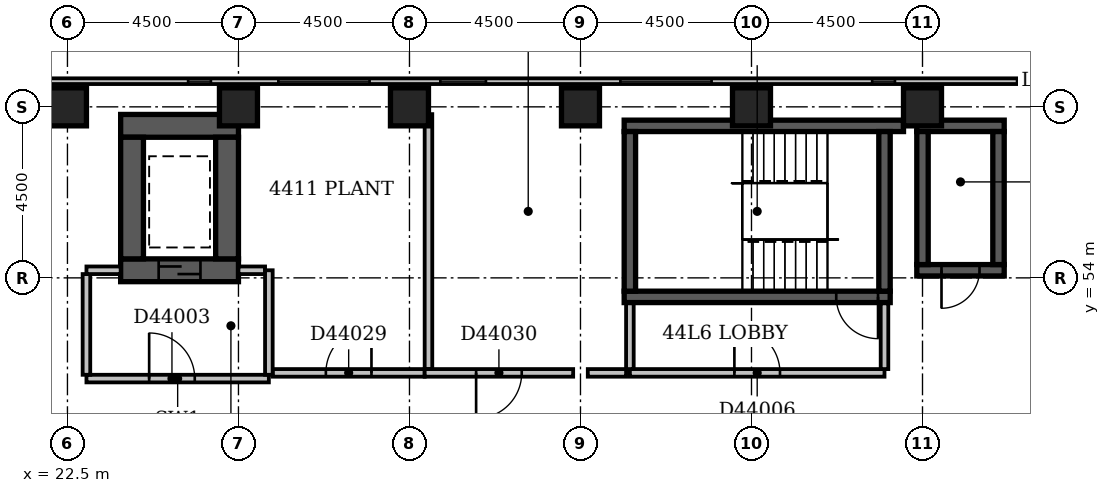
"""IFC4 building model, lengths in metres.
Left out: names, types, materials, properties, quantities, classifications, styles, units other than length and angle.
Written with IfcOpenShell. Run it as: python <this file> out.ifc"""

import sys

from ifc_helpers import new_model, si_unit, direction, frame, frame_2d, origin, origin_2d, place, context, subcontext, project, spatial, rectangle, extrude, element, fill, save


model = new_model("IFC4")
c1 = context("Model", 3, precision=1e-05, world=origin(), true_north=direction((0.0, 1.0)))
c2 = subcontext(c1, "Body", "Model", "MODEL_VIEW")
j1 = project(units=[si_unit("LENGTHUNIT", "METRE"), si_unit("PLANEANGLEUNIT", "RADIAN")], contexts=[c1])
p1 = place(None, origin())
s1 = spatial("IfcSite", under=j1, at=p1, CompositionType="ELEMENT")
p2 = place(p1, origin())
s2 = spatial("IfcBuilding", under=s1, at=p2, CompositionType="ELEMENT")
p3 = place(p2, frame((0.0, 0.0, 173.6)))
s3 = spatial("IfcBuildingStorey", under=s2, at=p3, CompositionType="ELEMENT", Elevation=173.6)
p4 = place(p3, frame((23.9, 54.2, -0.45), z_axis=(0.0, 0.0, 1.0), x_axis=(1.0, 0.0, 0.0)))
e1 = element("IfcWall", 1, at=p4, inside=s3, PredefinedType="SHEAR", context=c2, shape_type="SweptSolid", body=[
    extrude(rectangle(XDim=3.1, YDim=0.6, at=frame_2d((1.55, 0.0))), origin(), (0.0, 0.0, 1.0), 5.55),
])
p5 = place(p4, frame((1.0, 0.0, 0.45)))
e2 = element("IfcOpeningElement", 2, at=p5, cuts=e1, PredefinedType="OPENING", context=c2, shape_type="SweptSolid", body=[
    extrude(rectangle(XDim=1.1, YDim=2.1, at=frame_2d((0.55, 1.05))), frame((0.0, 0.312, 0.0), z_axis=(0.0, -1.0, 0.0), x_axis=(1.0, 0.0, 0.0)), (0.0, 0.0, 1.0), 0.624),
])
p6 = place(p3, frame((23.9, 58.0, -0.45), z_axis=(0.0, 0.0, 1.0), x_axis=(1.0, 0.0, 0.0)))
e3 = element("IfcWall", 3, at=p6, inside=s3, PredefinedType="SHEAR", context=c2, shape_type="SweptSolid", body=[
    extrude(rectangle(XDim=3.1, YDim=0.6, at=frame_2d((1.55, 0.0))), origin(), (0.0, 0.0, 1.0), 5.55),
])
for number, where, z_axis, x_axis in (
    (4, (24.2, 54.5, -0.45), (0.0, 0.0, 1.0), (0.0, 1.0, 0.0)),
    (5, (26.7, 54.5, -0.45), (0.0, 0.0, 1.0), (0.0, 1.0, 0.0)),
):
    element("IfcWall", number, at=place(p3, frame(where, z_axis=z_axis, x_axis=x_axis)), inside=s3, PredefinedType="SHEAR", context=c2, shape_type="SweptSolid", body=[
        extrude(rectangle(XDim=3.2, YDim=0.6, at=frame_2d((1.6, 0.0))), origin(), (0.0, 0.0, 1.0), 5.55),
    ])
p7 = place(p3, frame((37.15, 53.5, -0.45), z_axis=(0.0, 0.0, 1.0), x_axis=(1.0, 0.0, 0.0)))
e6 = element("IfcWall", 6, at=p7, inside=s3, PredefinedType="SHEAR", context=c2, shape_type="SweptSolid", body=[
    extrude(rectangle(XDim=7.0, YDim=0.3, at=frame_2d((3.5, 0.0))), origin(), (0.0, 0.0, 1.0), 5.55),
])
p8 = place(p7, frame((5.58, 0.0, 0.45)))
e7 = element("IfcOpeningElement", 7, at=p8, cuts=e6, PredefinedType="OPENING", context=c2, shape_type="SweptSolid", body=[
    extrude(rectangle(XDim=1.1, YDim=2.1, at=frame_2d((0.55, 1.05))), frame((0.0, 0.162, 0.0), z_axis=(0.0, -1.0, 0.0), x_axis=(1.0, 0.0, 0.0)), (0.0, 0.0, 1.0), 0.324),
])
p9 = place(p3, frame((37.15, 58.0, -0.45), z_axis=(0.0, 0.0, 1.0), x_axis=(1.0, 0.0, 0.0)))
e8 = element("IfcWall", 8, at=p9, inside=s3, PredefinedType="SHEAR", context=c2, shape_type="SweptSolid", body=[
    extrude(rectangle(XDim=7.35, YDim=0.3, at=frame_2d((3.675, 0.0))), origin(), (0.0, 0.0, 1.0), 5.55),
])
for number, where, z_axis, x_axis in (
    (9, (37.3, 53.65, -0.45), (0.0, 0.0, 1.0), (0.0, 1.0, 0.0)),
    (10, (44.0, 53.65, -0.45), (0.0, 0.0, 1.0), (0.0, 1.0, 0.0)),
):
    element("IfcWall", number, at=place(p3, frame(where, z_axis=z_axis, x_axis=x_axis)), inside=s3, PredefinedType="SHEAR", context=c2, shape_type="SweptSolid", body=[
        extrude(rectangle(XDim=4.2, YDim=0.3, at=frame_2d((2.1, 0.0))), origin(), (0.0, 0.0, 1.0), 5.55),
    ])
p10 = place(p3, frame((44.85, 54.2, -0.45), z_axis=(0.0, 0.0, 1.0), x_axis=(1.0, 0.0, 0.0)))
e11 = element("IfcWall", 11, at=p10, inside=s3, PredefinedType="SHEAR", context=c2, shape_type="SweptSolid", body=[
    extrude(rectangle(XDim=2.3, YDim=0.3, at=frame_2d((1.15, 0.0))), origin(), (0.0, 0.0, 1.0), 5.55),
])
p11 = place(p10, frame((0.65, 0.0, 0.45)))
e12 = element("IfcOpeningElement", 12, at=p11, cuts=e11, PredefinedType="OPENING", context=c2, shape_type="SweptSolid", body=[
    extrude(rectangle(XDim=1.0, YDim=2.1, at=frame_2d((0.5, 1.05))), frame((0.0, 0.162, 0.0), z_axis=(0.0, -1.0, 0.0), x_axis=(1.0, 0.0, 0.0)), (0.0, 0.0, 1.0), 0.324),
])
p12 = place(p3, frame((44.85, 58.0, -0.45), z_axis=(0.0, 0.0, 1.0), x_axis=(1.0, 0.0, 0.0)))
e13 = element("IfcWall", 13, at=p12, inside=s3, PredefinedType="SHEAR", context=c2, shape_type="SweptSolid", body=[
    extrude(rectangle(XDim=2.3, YDim=0.3, at=frame_2d((1.15, 0.0))), origin(), (0.0, 0.0, 1.0), 5.55),
])
for number, where, z_axis, x_axis in (
    (14, (45.0, 54.35, -0.45), (0.0, 0.0, 1.0), (0.0, 1.0, 0.0)),
    (15, (47.0, 54.35, -0.45), (0.0, 0.0, 1.0), (0.0, 1.0, 0.0)),
):
    element("IfcWall", number, at=place(p3, frame(where, z_axis=z_axis, x_axis=x_axis)), inside=s3, PredefinedType="SHEAR", context=c2, shape_type="SweptSolid", body=[
        extrude(rectangle(XDim=3.5, YDim=0.3, at=frame_2d((1.75, 0.0))), origin(), (0.0, 0.0, 1.0), 5.55),
    ])
for number, where, z_axis, x_axis in (
    (16, (22.5, 58.5, -0.45), (0.0, 0.0, 1.0), (1.0, 0.0, 0.0)),
    (17, (27.0, 58.5, -0.45), (0.0, 0.0, 1.0), (1.0, 0.0, 0.0)),
    (18, (31.5, 58.5, -0.45), (0.0, 0.0, 1.0), (1.0, 0.0, 0.0)),
    (19, (36.0, 58.5, -0.45), (0.0, 0.0, 1.0), (1.0, 0.0, 0.0)),
    (20, (40.5, 58.5, -0.45), (0.0, 0.0, 1.0), (1.0, 0.0, 0.0)),
    (21, (45.0, 58.5, -0.45), (0.0, 0.0, 1.0), (1.0, 0.0, 0.0)),
):
    element("IfcColumn", number, at=place(p3, frame(where, z_axis=z_axis, x_axis=x_axis)), inside=s3, PredefinedType="COLUMN", context=c2, shape_type="SweptSolid", body=[
        extrude(rectangle(XDim=1.0, YDim=1.0, at=origin_2d()), origin(), (0.0, 0.0, 1.0), 5.55),
    ])
p13 = place(p3, frame((68.1, 59.175, 0.0), z_axis=(0.0, 0.0, 1.0), x_axis=(-1.0, 0.0, 0.0)))
e22 = element("IfcWall", 22, at=p13, inside=s3, PredefinedType="STANDARD", context=c2, shape_type="SweptSolid", body=[
    extrude(rectangle(XDim=68.85, YDim=0.15, at=frame_2d((34.425, 0.0))), origin(), (0.0, 0.0, 1.0), 4.5),
])
p14 = place(p13, frame((1.65, 0.0, 0.6)))
e23 = element("IfcOpeningElement", 23, at=p14, cuts=e22, PredefinedType="OPENING", context=c2, shape_type="SweptSolid", body=[
    extrude(rectangle(XDim=2.4, YDim=2.4, at=frame_2d((1.2, 1.2))), frame((0.0, 0.087, 0.0), z_axis=(0.0, -1.0, 0.0), x_axis=(1.0, 0.0, 0.0)), (0.0, 0.0, 1.0), 0.174),
])
p15 = place(p13, frame((10.65, 0.0, 0.6)))
e24 = element("IfcOpeningElement", 24, at=p15, cuts=e22, PredefinedType="OPENING", context=c2, shape_type="SweptSolid", body=[
    extrude(rectangle(XDim=2.4, YDim=2.4, at=frame_2d((1.2, 1.2))), frame((0.0, 0.087, 0.0), z_axis=(0.0, -1.0, 0.0), x_axis=(1.0, 0.0, 0.0)), (0.0, 0.0, 1.0), 0.174),
])
p16 = place(p13, frame((14.825, 0.0, 0.6)))
e25 = element("IfcOpeningElement", 25, at=p16, cuts=e22, PredefinedType="OPENING", context=c2, shape_type="SweptSolid", body=[
    extrude(rectangle(XDim=0.6, YDim=2.4, at=frame_2d((0.3, 1.2))), frame((0.0, 0.087, 0.0), z_axis=(0.0, -1.0, 0.0), x_axis=(1.0, 0.0, 0.0)), (0.0, 0.0, 1.0), 0.174),
])
p17 = place(p13, frame((19.412, 0.0, 0.6)))
e26 = element("IfcOpeningElement", 26, at=p17, cuts=e22, PredefinedType="OPENING", context=c2, shape_type="SweptSolid", body=[
    extrude(rectangle(XDim=1.2, YDim=2.4, at=frame_2d((0.6, 1.2))), frame((0.0, 0.087, 0.0), z_axis=(0.0, -1.0, 0.0), x_axis=(1.0, 0.0, 0.0)), (0.0, 0.0, 1.0), 0.174),
])
p18 = place(p13, frame((23.825, 0.0, 0.6)))
e27 = element("IfcOpeningElement", 27, at=p18, cuts=e22, PredefinedType="OPENING", context=c2, shape_type="SweptSolid", body=[
    extrude(rectangle(XDim=0.6, YDim=2.4, at=frame_2d((0.3, 1.2))), frame((0.0, 0.087, 0.0), z_axis=(0.0, -1.0, 0.0), x_axis=(1.0, 0.0, 0.0)), (0.0, 0.0, 1.0), 0.174),
])
p19 = place(p13, frame((28.65, 0.0, 0.6)))
e28 = element("IfcOpeningElement", 28, at=p19, cuts=e22, PredefinedType="OPENING", context=c2, shape_type="SweptSolid", body=[
    extrude(rectangle(XDim=2.4, YDim=2.4, at=frame_2d((1.2, 1.2))), frame((0.0, 0.087, 0.0), z_axis=(0.0, -1.0, 0.0), x_axis=(1.0, 0.0, 0.0)), (0.0, 0.0, 1.0), 0.174),
])
p20 = place(p13, frame((34.588, 0.0, 0.6)))
e29 = element("IfcOpeningElement", 29, at=p20, cuts=e22, PredefinedType="OPENING", context=c2, shape_type="SweptSolid", body=[
    extrude(rectangle(XDim=1.2, YDim=2.4, at=frame_2d((0.6, 1.2))), frame((0.0, 0.087, 0.0), z_axis=(0.0, -1.0, 0.0), x_axis=(1.0, 0.0, 0.0)), (0.0, 0.0, 1.0), 0.174),
])
p21 = place(p13, frame((37.65, 0.0, 0.6)))
e30 = element("IfcOpeningElement", 30, at=p21, cuts=e22, PredefinedType="OPENING", context=c2, shape_type="SweptSolid", body=[
    extrude(rectangle(XDim=2.4, YDim=2.4, at=frame_2d((1.2, 1.2))), frame((0.0, 0.087, 0.0), z_axis=(0.0, -1.0, 0.0), x_axis=(1.0, 0.0, 0.0)), (0.0, 0.0, 1.0), 0.174),
])
p22 = place(p13, frame((41.825, 0.0, 0.6)))
e31 = element("IfcOpeningElement", 31, at=p22, cuts=e22, PredefinedType="OPENING", context=c2, shape_type="SweptSolid", body=[
    extrude(rectangle(XDim=0.6, YDim=2.4, at=frame_2d((0.3, 1.2))), frame((0.0, 0.087, 0.0), z_axis=(0.0, -1.0, 0.0), x_axis=(1.0, 0.0, 0.0)), (0.0, 0.0, 1.0), 0.174),
])
p23 = place(p13, frame((46.412, 0.0, 0.6)))
e32 = element("IfcOpeningElement", 32, at=p23, cuts=e22, PredefinedType="OPENING", context=c2, shape_type="SweptSolid", body=[
    extrude(rectangle(XDim=1.2, YDim=2.4, at=frame_2d((0.6, 1.2))), frame((0.0, 0.087, 0.0), z_axis=(0.0, -1.0, 0.0), x_axis=(1.0, 0.0, 0.0)), (0.0, 0.0, 1.0), 0.174),
])
p24 = place(p13, frame((50.825, 0.0, 0.6)))
e33 = element("IfcOpeningElement", 33, at=p24, cuts=e22, PredefinedType="OPENING", context=c2, shape_type="SweptSolid", body=[
    extrude(rectangle(XDim=0.6, YDim=2.4, at=frame_2d((0.3, 1.2))), frame((0.0, 0.087, 0.0), z_axis=(0.0, -1.0, 0.0), x_axis=(1.0, 0.0, 0.0)), (0.0, 0.0, 1.0), 0.174),
])
p25 = place(p13, frame((55.65, 0.0, 0.6)))
e34 = element("IfcOpeningElement", 34, at=p25, cuts=e22, PredefinedType="OPENING", context=c2, shape_type="SweptSolid", body=[
    extrude(rectangle(XDim=2.4, YDim=2.4, at=frame_2d((1.2, 1.2))), frame((0.0, 0.087, 0.0), z_axis=(0.0, -1.0, 0.0), x_axis=(1.0, 0.0, 0.0)), (0.0, 0.0, 1.0), 0.174),
])
p26 = place(p13, frame((64.65, 0.0, 0.6)))
e35 = element("IfcOpeningElement", 35, at=p26, cuts=e22, PredefinedType="OPENING", context=c2, shape_type="SweptSolid", body=[
    extrude(rectangle(XDim=2.4, YDim=2.4, at=frame_2d((1.2, 1.2))), frame((0.0, 0.087, 0.0), z_axis=(0.0, -1.0, 0.0), x_axis=(1.0, 0.0, 0.0)), (0.0, 0.0, 1.0), 0.174),
])
p27 = place(p3, frame((23.0, 51.35, 0.0), z_axis=(0.0, 0.0, 1.0), x_axis=(1.0, 0.0, 0.0)))
e36 = element("IfcWall", 36, at=p27, inside=s3, PredefinedType="PARTITIONING", context=c2, shape_type="SweptSolid", body=[
    extrude(rectangle(XDim=4.8, YDim=0.2, at=frame_2d((2.4, 0.0))), origin(), (0.0, 0.0, 1.0), 5.1),
])
p28 = place(p27, frame((1.65, 0.0, 0.0)))
e37 = element("IfcOpeningElement", 37, at=p28, cuts=e36, PredefinedType="OPENING", context=c2, shape_type="SweptSolid", body=[
    extrude(rectangle(XDim=1.2, YDim=2.1, at=frame_2d((0.6, 1.05))), frame((0.0, 0.112, 0.0), z_axis=(0.0, -1.0, 0.0), x_axis=(1.0, 0.0, 0.0)), (0.0, 0.0, 1.0), 0.224),
])
p29 = place(p3, frame((27.8, 51.45, 0.0), z_axis=(0.0, 0.0, 1.0), x_axis=(0.0, 1.0, 0.0)))
e38 = element("IfcWall", 38, at=p29, inside=s3, PredefinedType="PARTITIONING", context=c2, shape_type="SweptSolid", body=[
    extrude(rectangle(XDim=2.75, YDim=0.2, at=frame_2d((1.375, 0.0))), origin(), (0.0, 0.0, 1.0), 5.1),
])
p30 = place(p3, frame((23.0, 54.2, 0.0), z_axis=(0.0, 0.0, 1.0), x_axis=(1.0, 0.0, 0.0)))
e39 = element("IfcWall", 39, at=p30, inside=s3, PredefinedType="PARTITIONING", context=c2, shape_type="SweptSolid", body=[
    extrude(rectangle(XDim=0.9, YDim=0.2, at=frame_2d((0.45, 0.0))), origin(), (0.0, 0.0, 1.0), 5.1),
])
p31 = place(p3, frame((27.0, 54.2, 0.0), z_axis=(0.0, 0.0, 1.0), x_axis=(1.0, 0.0, 0.0)))
e40 = element("IfcWall", 40, at=p31, inside=s3, PredefinedType="PARTITIONING", context=c2, shape_type="SweptSolid", body=[
    extrude(rectangle(XDim=0.7, YDim=0.2, at=frame_2d((0.35, 0.0))), origin(), (0.0, 0.0, 1.0), 5.1),
])
p32 = place(p3, frame((23.0, 51.45, 0.0), z_axis=(0.0, 0.0, 1.0), x_axis=(0.0, 1.0, 0.0)))
e41 = element("IfcWall", 41, at=p32, inside=s3, PredefinedType="PARTITIONING", context=c2, shape_type="SweptSolid", body=[
    extrude(rectangle(XDim=2.65, YDim=0.2, at=frame_2d((1.325, 0.0))), origin(), (0.0, 0.0, 1.0), 5.1),
])
p33 = place(p3, frame((37.3, 51.5, 0.0), z_axis=(0.0, 0.0, 1.0), x_axis=(1.0, 0.0, 0.0)))
e42 = element("IfcWall", 42, at=p33, inside=s3, PredefinedType="PARTITIONING", context=c2, shape_type="SweptSolid", body=[
    extrude(rectangle(XDim=6.7, YDim=0.2, at=frame_2d((3.35, 0.0))), origin(), (0.0, 0.0, 1.0), 5.1),
])
p34 = place(p33, frame((2.75, 0.0, 0.0)))
e43 = element("IfcOpeningElement", 43, at=p34, cuts=e42, PredefinedType="OPENING", context=c2, shape_type="SweptSolid", body=[
    extrude(rectangle(XDim=1.2, YDim=2.1, at=frame_2d((0.6, 1.05))), frame((0.0, 0.112, 0.0), z_axis=(0.0, -1.0, 0.0), x_axis=(1.0, 0.0, 0.0)), (0.0, 0.0, 1.0), 0.224),
])
for number, where, z_axis, x_axis in (
    (44, (44.0, 51.6, 0.0), (0.0, 0.0, 1.0), (0.0, 1.0, 0.0)),
    (45, (37.3, 51.6, 0.0), (0.0, 0.0, 1.0), (0.0, 1.0, 0.0)),
):
    element("IfcWall", number, at=place(p3, frame(where, z_axis=z_axis, x_axis=x_axis)), inside=s3, PredefinedType="PARTITIONING", context=c2, shape_type="SweptSolid", body=[
        extrude(rectangle(XDim=1.73, YDim=0.2, at=frame_2d((0.865, 0.0))), origin(), (0.0, 0.0, 1.0), 5.1),
    ])
p35 = place(p3, frame((31.9, 51.5, 0.0), z_axis=(0.0, 0.0, 1.0), x_axis=(-1.0, 0.0, 0.0)))
e46 = element("IfcWall", 46, at=p35, inside=s3, PredefinedType="PARTITIONING", context=c2, shape_type="SweptSolid", body=[
    extrude(rectangle(XDim=4.0, YDim=0.2, at=frame_2d((2.0, 0.0))), origin(), (0.0, 0.0, 1.0), 5.1),
])
p36 = place(p35, frame((1.4, 0.0, 0.0)))
e47 = element("IfcOpeningElement", 47, at=p36, cuts=e46, PredefinedType="OPENING", context=c2, shape_type="SweptSolid", body=[
    extrude(rectangle(XDim=1.2, YDim=2.1, at=frame_2d((0.6, 1.05))), frame((0.0, 0.112, 0.0), z_axis=(0.0, -1.0, 0.0), x_axis=(1.0, 0.0, 0.0)), (0.0, 0.0, 1.0), 0.224),
])
p37 = place(p3, frame((37.2, 51.5, 0.0), z_axis=(0.0, 0.0, 1.0), x_axis=(-1.0, 0.0, 0.0)))
e48 = element("IfcWall", 48, at=p37, inside=s3, PredefinedType="PARTITIONING", context=c2, shape_type="SweptSolid", body=[
    extrude(rectangle(XDim=1.008, YDim=0.2, at=frame_2d((0.504, 0.0))), origin(), (0.0, 0.0, 1.0), 5.1),
])
p38 = place(p3, frame((35.808, 51.5, 0.0), z_axis=(0.0, 0.0, 1.0), x_axis=(-1.0, 0.0, 0.0)))
e49 = element("IfcWall", 49, at=p38, inside=s3, PredefinedType="PARTITIONING", context=c2, shape_type="SweptSolid", body=[
    extrude(rectangle(XDim=3.908, YDim=0.2, at=frame_2d((1.954, 0.0))), origin(), (0.0, 0.0, 1.0), 5.1),
])
p39 = place(p38, frame((1.354, 0.0, 0.0)))
e50 = element("IfcOpeningElement", 50, at=p39, cuts=e49, PredefinedType="OPENING", context=c2, shape_type="SweptSolid", body=[
    extrude(rectangle(XDim=1.2, YDim=2.1, at=frame_2d((0.6, 1.05))), frame((0.0, 0.112, 0.0), z_axis=(0.0, -1.0, 0.0), x_axis=(1.0, 0.0, 0.0)), (0.0, 0.0, 1.0), 0.224),
])
p40 = place(p3, frame((32.0, 58.309, 0.0), z_axis=(0.0, 0.0, 1.0), x_axis=(0.0, -1.0, 0.0)))
e51 = element("IfcWall", 51, at=p40, inside=s3, PredefinedType="PARTITIONING", context=c2, shape_type="SweptSolid", body=[
    extrude(rectangle(XDim=6.708, YDim=0.2, at=frame_2d((3.354, 0.0))), origin(), (0.0, 0.0, 1.0), 5.1),
])
p41 = place(p17, origin())
e52 = element("IfcWindow", 52, at=p41, inside=s3, PartitioningType="SINGLE_PANEL", PredefinedType="USERDEFINED", context=c2, shape_type="SweptSolid", body=[
    extrude(rectangle(XDim=1.2, YDim=2.4, at=frame_2d((0.6, 1.2))), frame((0.0, 0.03, 0.0), z_axis=(0.0, -1.0, 0.0), x_axis=(1.0, 0.0, 0.0)), (0.0, 0.0, 1.0), 0.06),
])
fill(e26, e52)
p42 = place(p18, origin())
e53 = element("IfcWindow", 53, at=p42, inside=s3, PartitioningType="SINGLE_PANEL", PredefinedType="USERDEFINED", context=c2, shape_type="SweptSolid", body=[
    extrude(rectangle(XDim=0.6, YDim=2.4, at=frame_2d((0.3, 1.2))), frame((0.0, 0.03, 0.0), z_axis=(0.0, -1.0, 0.0), x_axis=(1.0, 0.0, 0.0)), (0.0, 0.0, 1.0), 0.06),
])
fill(e27, e53)
p43 = place(p19, origin())
e54 = element("IfcWindow", 54, at=p43, inside=s3, PartitioningType="SINGLE_PANEL", PredefinedType="USERDEFINED", context=c2, shape_type="SweptSolid", body=[
    extrude(rectangle(XDim=2.4, YDim=2.4, at=frame_2d((1.2, 1.2))), frame((0.0, 0.03, 0.0), z_axis=(0.0, -1.0, 0.0), x_axis=(1.0, 0.0, 0.0)), (0.0, 0.0, 1.0), 0.06),
])
fill(e28, e54)
p44 = place(p20, origin())
e55 = element("IfcWindow", 55, at=p44, inside=s3, PartitioningType="SINGLE_PANEL", PredefinedType="USERDEFINED", context=c2, shape_type="SweptSolid", body=[
    extrude(rectangle(XDim=1.2, YDim=2.4, at=frame_2d((0.6, 1.2))), frame((0.0, 0.03, 0.0), z_axis=(0.0, -1.0, 0.0), x_axis=(1.0, 0.0, 0.0)), (0.0, 0.0, 1.0), 0.06),
])
fill(e29, e55)
p45 = place(p21, origin())
e56 = element("IfcWindow", 56, at=p45, inside=s3, PartitioningType="SINGLE_PANEL", PredefinedType="USERDEFINED", context=c2, shape_type="SweptSolid", body=[
    extrude(rectangle(XDim=2.4, YDim=2.4, at=frame_2d((1.2, 1.2))), frame((0.0, 0.03, 0.0), z_axis=(0.0, -1.0, 0.0), x_axis=(1.0, 0.0, 0.0)), (0.0, 0.0, 1.0), 0.06),
])
fill(e30, e56)
p46 = place(p22, origin())
e57 = element("IfcWindow", 57, at=p46, inside=s3, PartitioningType="SINGLE_PANEL", PredefinedType="USERDEFINED", context=c2, shape_type="SweptSolid", body=[
    extrude(rectangle(XDim=0.6, YDim=2.4, at=frame_2d((0.3, 1.2))), frame((0.0, 0.03, 0.0), z_axis=(0.0, -1.0, 0.0), x_axis=(1.0, 0.0, 0.0)), (0.0, 0.0, 1.0), 0.06),
])
fill(e31, e57)
p47 = place(p28, origin())
e58 = element("IfcDoor", 58, at=p47, inside=s3, OperationType="SINGLE_SWING_LEFT", PredefinedType="DOOR", context=c2, shape_type="SweptSolid", body=[
    extrude(rectangle(XDim=1.2, YDim=2.1, at=frame_2d((0.6, 1.05))), frame((0.0, 0.025, 0.0), z_axis=(0.0, -1.0, 0.0), x_axis=(1.0, 0.0, 0.0)), (0.0, 0.0, 1.0), 0.05),
])
fill(e37, e58)
p48 = place(p5, origin())
e59 = element("IfcDoor", 59, at=p48, inside=s3, OperationType="SLIDING_TO_LEFT", PredefinedType="DOOR", context=c2, shape_type="SweptSolid", body=[
    extrude(rectangle(XDim=1.1, YDim=2.1, at=frame_2d((0.55, 1.05))), frame((0.0, 0.025, 0.0), z_axis=(0.0, -1.0, 0.0), x_axis=(1.0, 0.0, 0.0)), (0.0, 0.0, 1.0), 0.05),
])
fill(e2, e59)
p49 = place(p34, origin())
e60 = element("IfcDoor", 60, at=p49, inside=s3, OperationType="SINGLE_SWING_LEFT", PredefinedType="DOOR", context=c2, shape_type="SweptSolid", body=[
    extrude(rectangle(XDim=1.2, YDim=2.1, at=frame_2d((0.6, 1.05))), frame((0.0, 0.025, 0.0), z_axis=(0.0, -1.0, 0.0), x_axis=(1.0, 0.0, 0.0)), (0.0, 0.0, 1.0), 0.05),
])
fill(e43, e60)
p50 = place(p11, frame((1.0, 0.0, 0.0), z_axis=(0.0, 0.0, 1.0), x_axis=(-1.0, 0.0, 0.0)))
e61 = element("IfcDoor", 61, at=p50, inside=s3, OperationType="SINGLE_SWING_RIGHT", PredefinedType="DOOR", context=c2, shape_type="SweptSolid", body=[
    extrude(rectangle(XDim=1.0, YDim=2.1, at=frame_2d((0.5, 1.05))), frame((0.0, 0.025, 0.0), z_axis=(0.0, -1.0, 0.0), x_axis=(1.0, 0.0, 0.0)), (0.0, 0.0, 1.0), 0.05),
])
fill(e12, e61)
p51 = place(p8, origin())
e62 = element("IfcDoor", 62, at=p51, inside=s3, OperationType="SINGLE_SWING_RIGHT", PredefinedType="DOOR", context=c2, shape_type="SweptSolid", body=[
    extrude(rectangle(XDim=1.1, YDim=2.1, at=frame_2d((0.55, 1.05))), frame((0.0, 0.025, 0.0), z_axis=(0.0, -1.0, 0.0), x_axis=(1.0, 0.0, 0.0)), (0.0, 0.0, 1.0), 0.05),
])
fill(e7, e62)
p52 = place(p36, frame((1.2, 0.0, 0.0), z_axis=(0.0, 0.0, 1.0), x_axis=(-1.0, 0.0, 0.0)))
e63 = element("IfcDoor", 63, at=p52, inside=s3, OperationType="SINGLE_SWING_RIGHT", PredefinedType="DOOR", context=c2, shape_type="SweptSolid", body=[
    extrude(rectangle(XDim=1.2, YDim=2.1, at=frame_2d((0.6, 1.05))), frame((0.0, 0.025, 0.0), z_axis=(0.0, -1.0, 0.0), x_axis=(1.0, 0.0, 0.0)), (0.0, 0.0, 1.0), 0.05),
])
fill(e47, e63)
p53 = place(p39, frame((1.2, 0.0, 0.0), z_axis=(0.0, 0.0, 1.0), x_axis=(-1.0, 0.0, 0.0)))
e64 = element("IfcDoor", 64, at=p53, inside=s3, OperationType="SINGLE_SWING_LEFT", PredefinedType="DOOR", context=c2, shape_type="SweptSolid", body=[
    extrude(rectangle(XDim=1.2, YDim=2.1, at=frame_2d((0.6, 1.05))), frame((0.0, 0.025, 0.0), z_axis=(0.0, -1.0, 0.0), x_axis=(1.0, 0.0, 0.0)), (0.0, 0.0, 1.0), 0.05),
])
fill(e50, e64)
save(model, sys.argv[1])
